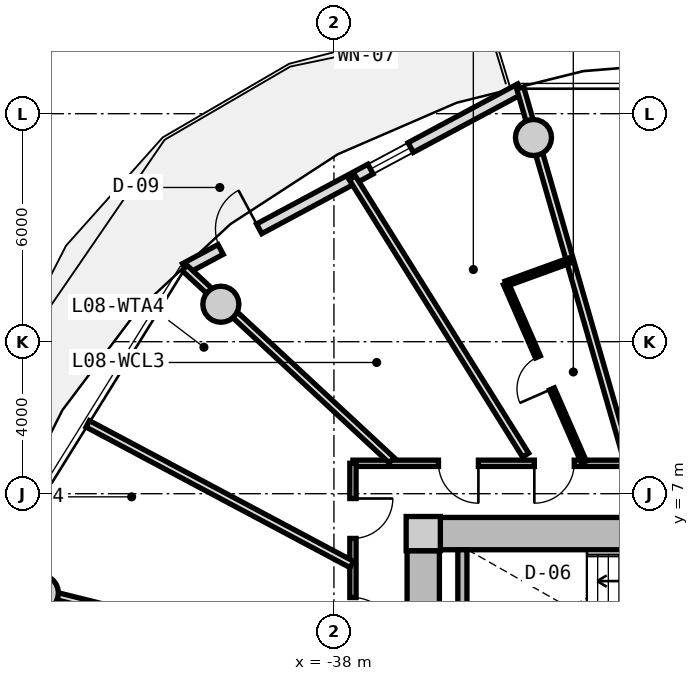
"""IFC4 building model, lengths in metres.
Left out: names, types, materials, properties, quantities, classifications, styles, units other than length and angle.
Written with IfcOpenShell. Run it as: python <this file> out.ifc"""

import sys

from ifc_helpers import new_model, si_unit, direction, frame, frame_2d, origin, origin_2d, place, context, subcontext, project, spatial, rectangle, circle, extrude, source, transform, mapped, element, fill, save


model = new_model("IFC4")
c1 = context("Model", 3, precision=1e-05, world=origin(), true_north=direction((0.0, 1.0)))
c2 = subcontext(c1, "Body", "Model", "MODEL_VIEW")
j1 = project(units=[si_unit("LENGTHUNIT", "METRE"), si_unit("PLANEANGLEUNIT", "RADIAN")], contexts=[c1])
p1 = place(None, origin())
s1 = spatial("IfcSite", under=j1, at=p1, CompositionType="ELEMENT")
p2 = place(p1, origin())
s2 = spatial("IfcBuilding", under=s1, at=p2, CompositionType="ELEMENT")
p3 = place(p2, frame((0.0, 0.0, 30.75)))
s3 = spatial("IfcBuildingStorey", under=s2, at=p3, CompositionType="ELEMENT", Elevation=30.75)
m1 = source(origin(), c2, "Body", "SweptSolid", [
    extrude(rectangle(XDim=0.9, YDim=0.9, at=origin_2d()), origin(), (0.0, 0.0, 1.0), 3.05),
])
p4 = place(p3, frame((-35.65, 5.95, 0.0), z_axis=(0.0, 0.0, 1.0), x_axis=(1.0, 0.0, 0.0)))
e1 = element("IfcColumn", 1, at=p4, inside=s3, PredefinedType="COLUMN", context=c2, shape_type="MappedRepresentation", body=[
    mapped(m1, transform((0.0, 0.0, 0.0), x_axis=(1.0, 0.0, 0.0), y_axis=(0.0, 1.0, 0.0), z_axis=(0.0, 0.0, 1.0), scale=1.0)),
])
m2 = source(origin(), c2, "Body", "SweptSolid", [
    extrude(rectangle(XDim=14.4, YDim=0.85, at=frame_2d((7.2, 0.0))), origin(), (0.0, 0.0, 1.0), 2.79),
])
p5 = place(p3, frame((-35.2, 5.95, 0.0), z_axis=(0.0, 0.0, 1.0), x_axis=(1.0, 0.0, 0.0)))
e2 = element("IfcWall", 2, at=p5, inside=s3, PredefinedType="SHEAR", context=c2, shape_type="MappedRepresentation", body=[
    mapped(m2, transform((0.0, 0.0, 0.0), x_axis=(1.0, 0.0, 0.0), y_axis=(0.0, 1.0, 0.0), z_axis=(0.0, 0.0, 1.0), scale=1.0)),
])
m3 = source(origin(), c2, "Body", "SweptSolid", [
    extrude(rectangle(XDim=11.0, YDim=0.85, at=frame_2d((5.5, 0.0))), origin(), (0.0, 0.0, 1.0), 2.79),
])
p6 = place(p3, frame((-35.65, -5.5, 0.0), z_axis=(0.0, 0.0, 1.0), x_axis=(0.0, 1.0, 0.0)))
e3 = element("IfcWall", 3, at=p6, inside=s3, PredefinedType="SHEAR", context=c2, shape_type="MappedRepresentation", body=[
    mapped(m3, transform((0.0, 0.0, 0.0), x_axis=(1.0, 0.0, 0.0), y_axis=(0.0, 1.0, 0.0), z_axis=(0.0, 0.0, 1.0), scale=1.0)),
])
p7 = place(p6, frame((3.8, 0.0, 0.0)))
e4 = element("IfcOpeningElement", 4, at=p7, cuts=e3, PredefinedType="OPENING", context=c2, shape_type="SweptSolid", body=[
    extrude(rectangle(XDim=1.2, YDim=2.15, at=frame_2d((0.6, 1.075))), frame((0.0, 0.435, 0.0), z_axis=(0.0, -1.0, 0.0), x_axis=(1.0, 0.0, 0.0)), (0.0, 0.0, 1.0), 0.87),
])
m4 = source(origin(), c2, "Body", "SweptSolid", [
    extrude(circle(Radius=0.475, at=origin_2d()), origin(), (0.0, 0.0, 1.0), 3.05),
])
for number, where, z_axis, x_axis in (
    (5, (-32.749, 16.373, 0.0), (0.0, 0.0, 1.0), (1.0, 0.0, 0.0)),
    (6, (-40.975, 11.985, 0.0), (0.0, 0.0, 1.0), (1.0, 0.0, 0.0)),
    (7, (-45.725, 4.387, 0.0), (0.0, 0.0, 1.0), (1.0, 0.0, 0.0)),
):
    element("IfcColumn", number, at=place(p3, frame(where, z_axis=z_axis, x_axis=x_axis)), inside=s3, PredefinedType="COLUMN", context=c2, shape_type="MappedRepresentation", body=[
        mapped(m4, transform((0.0, 0.0, 0.0), x_axis=(1.0, 0.0, 0.0), y_axis=(0.0, 1.0, 0.0), z_axis=(0.0, 0.0, 1.0), scale=1.0)),
    ])
m5 = source(origin(), c2, "Body", "SweptSolid", [
    extrude(rectangle(XDim=10.011, YDim=0.29, at=frame_2d((5.005, 0.0))), origin(), (0.0, 0.0, 1.0), 2.79),
])
p8 = place(p3, frame((-41.916, 12.926, 0.0), z_axis=(0.0, 0.0, 1.0), x_axis=(0.881272505317, 0.472608475773, 0.0)))
e8 = element("IfcWall", 8, at=p8, inside=s3, PredefinedType="SOLIDWALL", context=c2, shape_type="MappedRepresentation", body=[
    mapped(m5, transform((0.0, 0.0, 0.0), x_axis=(1.0, 0.0, 0.0), y_axis=(0.0, 1.0, 0.0), z_axis=(0.0, 0.0, 1.0), scale=1.0)),
])
p9 = place(p8, frame((1.06, 0.0, 0.0)))
e9 = element("IfcOpeningElement", 9, at=p9, cuts=e8, PredefinedType="OPENING", context=c2, shape_type="SweptSolid", body=[
    extrude(rectangle(XDim=1.15, YDim=2.25, at=frame_2d((0.575, 1.125))), frame((0.0, 0.155, 0.0), z_axis=(0.0, -1.0, 0.0), x_axis=(1.0, 0.0, 0.0)), (0.0, 0.0, 1.0), 0.31),
])
p10 = place(p8, frame((5.535, 0.0, 0.85)))
e10 = element("IfcOpeningElement", 10, at=p10, cuts=e8, PredefinedType="OPENING", context=c2, shape_type="SweptSolid", body=[
    extrude(rectangle(XDim=1.2, YDim=1.5, at=frame_2d((0.6, 0.75))), frame((0.0, 0.155, 0.0), z_axis=(0.0, -1.0, 0.0), x_axis=(1.0, 0.0, 0.0)), (0.0, 0.0, 1.0), 0.31),
])
m6 = source(origin(), c2, "Body", "SweptSolid", [
    extrude(rectangle(XDim=3.075, YDim=0.24, at=frame_2d((1.538, 0.0))), origin(), (0.0, 0.0, 1.0), 2.79),
])
p11 = place(p3, frame((-34.62, 2.45, 0.0), z_axis=(0.0, 0.0, 1.0), x_axis=(0.0, 1.0, 0.0)))
e11 = element("IfcWall", 11, at=p11, inside=s3, PredefinedType="PARTITIONING", context=c2, shape_type="MappedRepresentation", body=[
    mapped(m6, transform((0.0, 0.0, 0.0), x_axis=(1.0, 0.0, 0.0), y_axis=(0.0, 1.0, 0.0), z_axis=(0.0, 0.0, 1.0), scale=1.0)),
])
m7 = source(origin(), c2, "Body", "SweptSolid", [
    extrude(rectangle(XDim=19.0, YDim=0.165, at=frame_2d((9.5, 0.0))), origin(), (0.0, 0.0, 1.0), 2.775),
])
p12 = place(p3, frame((-37.5, 7.8, 0.0), z_axis=(0.0, 0.0, 1.0), x_axis=(1.0, 0.0, 0.0)))
e12 = element("IfcWall", 12, at=p12, inside=s3, PredefinedType="PARTITIONING", context=c2, shape_type="MappedRepresentation", body=[
    mapped(m7, transform((0.0, 0.0, 0.0), x_axis=(1.0, 0.0, 0.0), y_axis=(0.0, 1.0, 0.0), z_axis=(0.0, 0.0, 1.0), scale=1.0)),
])
p13 = place(p12, frame((9.352, 0.0, 0.0)))
e13 = element("IfcOpeningElement", 13, at=p13, cuts=e12, PredefinedType="OPENING", context=c2, shape_type="SweptSolid", body=[
    extrude(rectangle(XDim=1.05, YDim=2.15, at=frame_2d((0.525, 1.075))), frame((0.0, 0.093, 0.0), z_axis=(0.0, -1.0, 0.0), x_axis=(1.0, 0.0, 0.0)), (0.0, 0.0, 1.0), 0.185),
])
p14 = place(p12, frame((7.806, 0.0, 0.0)))
e14 = element("IfcOpeningElement", 14, at=p14, cuts=e12, PredefinedType="OPENING", context=c2, shape_type="SweptSolid", body=[
    extrude(rectangle(XDim=1.05, YDim=2.15, at=frame_2d((0.525, 1.075))), frame((0.0, 0.093, 0.0), z_axis=(0.0, -1.0, 0.0), x_axis=(1.0, 0.0, 0.0)), (0.0, 0.0, 1.0), 0.185),
])
p15 = place(p12, frame((4.773, 0.0, 0.0)))
e15 = element("IfcOpeningElement", 15, at=p15, cuts=e12, PredefinedType="OPENING", context=c2, shape_type="SweptSolid", body=[
    extrude(rectangle(XDim=1.05, YDim=2.15, at=frame_2d((0.525, 1.075))), frame((0.0, 0.093, 0.0), z_axis=(0.0, -1.0, 0.0), x_axis=(1.0, 0.0, 0.0)), (0.0, 0.0, 1.0), 0.185),
])
p16 = place(p12, frame((2.251, 0.0, 0.0)))
e16 = element("IfcOpeningElement", 16, at=p16, cuts=e12, PredefinedType="OPENING", context=c2, shape_type="SweptSolid", body=[
    extrude(rectangle(XDim=1.05, YDim=2.15, at=frame_2d((0.525, 1.075))), frame((0.0, 0.093, 0.0), z_axis=(0.0, -1.0, 0.0), x_axis=(1.0, 0.0, 0.0)), (0.0, 0.0, 1.0), 0.185),
])
p17 = place(p12, frame((14.653, 0.0, 0.0)))
e17 = element("IfcOpeningElement", 17, at=p17, cuts=e12, PredefinedType="OPENING", context=c2, shape_type="SweptSolid", body=[
    extrude(rectangle(XDim=1.05, YDim=2.15, at=frame_2d((0.525, 1.075))), frame((0.0, 0.093, 0.0), z_axis=(0.0, -1.0, 0.0), x_axis=(1.0, 0.0, 0.0)), (0.0, 0.0, 1.0), 0.185),
])
p18 = place(p12, frame((12.5, 0.0, 0.0)))
e18 = element("IfcOpeningElement", 18, at=p18, cuts=e12, PredefinedType="OPENING", context=c2, shape_type="SweptSolid", body=[
    extrude(rectangle(XDim=1.05, YDim=2.15, at=frame_2d((0.525, 1.075))), frame((0.0, 0.093, 0.0), z_axis=(0.0, -1.0, 0.0), x_axis=(1.0, 0.0, 0.0)), (0.0, 0.0, 1.0), 0.185),
])
m8 = source(origin(), c2, "Body", "SweptSolid", [
    extrude(rectangle(XDim=15.6, YDim=0.165, at=frame_2d((7.8, 0.0))), origin(), (0.0, 0.0, 1.0), 2.775),
])
p19 = place(p3, frame((-37.5, -7.8, 0.0), z_axis=(0.0, 0.0, 1.0), x_axis=(0.0, 1.0, 0.0)))
e19 = element("IfcWall", 19, at=p19, inside=s3, PredefinedType="PARTITIONING", context=c2, shape_type="MappedRepresentation", body=[
    mapped(m8, transform((0.0, 0.0, 0.0), x_axis=(1.0, 0.0, 0.0), y_axis=(0.0, 1.0, 0.0), z_axis=(0.0, 0.0, 1.0), scale=1.0)),
])
p20 = place(p19, frame((13.623, 0.0, 0.0)))
e20 = element("IfcOpeningElement", 20, at=p20, cuts=e19, PredefinedType="OPENING", context=c2, shape_type="SweptSolid", body=[
    extrude(rectangle(XDim=1.05, YDim=2.15, at=frame_2d((0.525, 1.075))), frame((0.0, 0.093, 0.0), z_axis=(0.0, -1.0, 0.0), x_axis=(1.0, 0.0, 0.0)), (0.0, 0.0, 1.0), 0.185),
])
p21 = place(p19, frame((11.018, 0.0, 0.0)))
e21 = element("IfcOpeningElement", 21, at=p21, cuts=e19, PredefinedType="OPENING", context=c2, shape_type="SweptSolid", body=[
    extrude(rectangle(XDim=1.05, YDim=2.15, at=frame_2d((0.525, 1.075))), frame((0.0, 0.093, 0.0), z_axis=(0.0, -1.0, 0.0), x_axis=(1.0, 0.0, 0.0)), (0.0, 0.0, 1.0), 0.185),
])
p22 = place(p19, frame((8.467, 0.0, 0.0)))
e22 = element("IfcOpeningElement", 22, at=p22, cuts=e19, PredefinedType="OPENING", context=c2, shape_type="SweptSolid", body=[
    extrude(rectangle(XDim=1.05, YDim=2.15, at=frame_2d((0.525, 1.075))), frame((0.0, 0.093, 0.0), z_axis=(0.0, -1.0, 0.0), x_axis=(1.0, 0.0, 0.0)), (0.0, 0.0, 1.0), 0.185),
])
p23 = place(p19, frame((6.035, 0.0, 0.0)))
e23 = element("IfcOpeningElement", 23, at=p23, cuts=e19, PredefinedType="OPENING", context=c2, shape_type="SweptSolid", body=[
    extrude(rectangle(XDim=1.05, YDim=2.15, at=frame_2d((0.525, 1.075))), frame((0.0, 0.093, 0.0), z_axis=(0.0, -1.0, 0.0), x_axis=(1.0, 0.0, 0.0)), (0.0, 0.0, 1.0), 0.185),
])
p24 = place(p19, frame((4.034, 0.0, 0.0)))
e24 = element("IfcOpeningElement", 24, at=p24, cuts=e19, PredefinedType="OPENING", context=c2, shape_type="SweptSolid", body=[
    extrude(rectangle(XDim=0.92, YDim=2.1, at=frame_2d((0.46, 1.05))), frame((0.0, 0.093, 0.0), z_axis=(0.0, -1.0, 0.0), x_axis=(1.0, 0.0, 0.0)), (0.0, 0.0, 1.0), 0.185),
])
p25 = place(p19, frame((1.426, 0.0, 0.0)))
e25 = element("IfcOpeningElement", 25, at=p25, cuts=e19, PredefinedType="OPENING", context=c2, shape_type="SweptSolid", body=[
    extrude(rectangle(XDim=0.92, YDim=2.1, at=frame_2d((0.46, 1.05))), frame((0.0, 0.093, 0.0), z_axis=(0.0, -1.0, 0.0), x_axis=(1.0, 0.0, 0.0)), (0.0, 0.0, 1.0), 0.185),
])
m9 = source(origin(), c2, "Body", "SweptSolid", [
    extrude(rectangle(XDim=10.196, YDim=0.19, at=frame_2d((5.098, 0.0))), origin(), (0.0, 0.0, 1.0), 2.225),
])
p26 = place(p3, frame((-30.273, 7.88, 0.0), z_axis=(0.0, 0.0, 1.0), x_axis=(-0.277136420347, 0.960830580549, 0.0)))
e26 = element("IfcWall", 26, at=p26, inside=s3, PredefinedType="PARTITIONING", context=c2, shape_type="MappedRepresentation", body=[
    mapped(m9, transform((0.0, 0.0, 0.0), x_axis=(1.0, 0.0, 0.0), y_axis=(0.0, 1.0, 0.0), z_axis=(0.0, 0.0, 1.0), scale=1.0)),
])
m10 = source(origin(), c2, "Body", "SweptSolid", [
    extrude(rectangle(XDim=7.435, YDim=0.19, at=frame_2d((3.717, 0.0))), origin(), (0.0, 0.0, 1.0), 2.225),
])
p27 = place(p3, frame((-36.483, 7.88, 0.0), z_axis=(0.0, 0.0, 1.0), x_axis=(-0.732651956848, 0.680603489652, 0.0)))
e27 = element("IfcWall", 27, at=p27, inside=s3, PredefinedType="PARTITIONING", context=c2, shape_type="MappedRepresentation", body=[
    mapped(m10, transform((0.0, 0.0, 0.0), x_axis=(1.0, 0.0, 0.0), y_axis=(0.0, 1.0, 0.0), z_axis=(0.0, 0.0, 1.0), scale=1.0)),
])
m11 = source(origin(), c2, "Body", "SweptSolid", [
    extrude(rectangle(XDim=8.598, YDim=0.19, at=frame_2d((4.299, 0.0))), origin(), (0.0, 0.0, 1.0), 2.775),
])
p28 = place(p3, frame((-32.957, 8.017, 0.0), z_axis=(0.0, 0.0, 1.0), x_axis=(-0.530039776395, 0.847972779893, 0.0)))
e28 = element("IfcWall", 28, at=p28, inside=s3, PredefinedType="PARTITIONING", context=c2, shape_type="MappedRepresentation", body=[
    mapped(m11, transform((0.0, 0.0, 0.0), x_axis=(1.0, 0.0, 0.0), y_axis=(0.0, 1.0, 0.0), z_axis=(0.0, 0.0, 1.0), scale=1.0)),
])
m12 = source(origin(), c2, "Body", "SweptSolid", [
    extrude(rectangle(XDim=5.126, YDim=0.14, at=frame_2d((2.563, 0.0))), origin(), (0.0, 0.0, 1.0), 2.775),
])
p29 = place(p3, frame((-31.422, 7.83, 0.0), z_axis=(0.0, 0.0, 1.0), x_axis=(-0.400473994842, 0.916308124735, 0.0)))
e29 = element("IfcWall", 29, at=p29, inside=s3, PredefinedType="PARTITIONING", context=c2, shape_type="MappedRepresentation", body=[
    mapped(m12, transform((0.0, 0.0, 0.0), x_axis=(1.0, 0.0, 0.0), y_axis=(0.0, 1.0, 0.0), z_axis=(0.0, 0.0, 1.0), scale=1.0)),
])
p30 = place(p29, frame((2.103, 0.0, 0.0)))
e30 = element("IfcOpeningElement", 30, at=p30, cuts=e29, PredefinedType="OPENING", context=c2, shape_type="SweptSolid", body=[
    extrude(rectangle(XDim=0.92, YDim=2.1, at=frame_2d((0.46, 1.05))), frame((0.0, 0.08, 0.0), z_axis=(0.0, -1.0, 0.0), x_axis=(1.0, 0.0, 0.0)), (0.0, 0.0, 1.0), 0.16),
])
m13 = source(origin(), c2, "Body", "SweptSolid", [
    extrude(rectangle(XDim=1.811, YDim=0.14, at=frame_2d((0.906, 0.0))), origin(), (0.0, 0.0, 1.0), 2.775),
])
p31 = place(p3, frame((-33.475, 12.527, 0.0), z_axis=(0.0, 0.0, 1.0), x_axis=(0.940009682452, 0.341147764021, 0.0)))
e31 = element("IfcWall", 31, at=p31, inside=s3, PredefinedType="PARTITIONING", context=c2, shape_type="MappedRepresentation", body=[
    mapped(m13, transform((0.0, 0.0, 0.0), x_axis=(1.0, 0.0, 0.0), y_axis=(0.0, 1.0, 0.0), z_axis=(0.0, 0.0, 1.0), scale=1.0)),
])
m14 = source(origin(), c2, "Body", "SweptSolid", [
    extrude(rectangle(XDim=9.737, YDim=0.19, at=frame_2d((4.869, 0.0))), origin(), (0.0, 0.0, 1.0), 2.415),
])
p32 = place(p3, frame((-37.58, 2.385, 0.0), z_axis=(0.0, 0.0, 1.0), x_axis=(-0.970392716238, 0.241532557375, 0.0)))
e32 = element("IfcWall", 32, at=p32, inside=s3, PredefinedType="PARTITIONING", context=c2, shape_type="MappedRepresentation", body=[
    mapped(m14, transform((0.0, 0.0, 0.0), x_axis=(1.0, 0.0, 0.0), y_axis=(0.0, 1.0, 0.0), z_axis=(0.0, 0.0, 1.0), scale=1.0)),
])
m15 = source(origin(), c2, "Body", "SweptSolid", [
    extrude(rectangle(XDim=7.873, YDim=0.19, at=frame_2d((3.937, 0.0))), origin(), (0.0, 0.0, 1.0), 2.775),
])
p33 = place(p3, frame((-37.53, 5.138, 0.0), z_axis=(0.0, 0.0, 1.0), x_axis=(-0.882666052726, 0.470000680175, 0.0)))
e33 = element("IfcWall", 33, at=p33, inside=s3, PredefinedType="PARTITIONING", context=c2, shape_type="MappedRepresentation", body=[
    mapped(m15, transform((0.0, 0.0, 0.0), x_axis=(1.0, 0.0, 0.0), y_axis=(0.0, 1.0, 0.0), z_axis=(0.0, 0.0, 1.0), scale=1.0)),
])
m16 = source(origin(), c2, "Body", "SweptSolid", [
    extrude(rectangle(XDim=1.15, YDim=2.25, at=frame_2d((0.575, 1.125))), frame((0.0, 0.025, 0.0), z_axis=(0.0, -1.0, 0.0), x_axis=(1.0, 0.0, 0.0)), (0.0, 0.0, 1.0), 0.05),
])
p34 = place(p9, origin())
e34 = element("IfcDoor", 34, at=p34, inside=s3, OperationType="SINGLE_SWING_RIGHT", PredefinedType="DOOR", context=c2, shape_type="MappedRepresentation", body=[
    mapped(m16, transform((0.0, 0.0, 0.0), x_axis=(1.0, 0.0, 0.0), y_axis=(0.0, 1.0, 0.0), z_axis=(0.0, 0.0, 1.0), scale=1.0)),
])
fill(e9, e34)
m17 = source(origin(), c2, "Body", "SweptSolid", [
    extrude(rectangle(XDim=1.2, YDim=1.5, at=frame_2d((0.6, 0.75))), frame((0.0, 0.03, 0.0), z_axis=(0.0, -1.0, 0.0), x_axis=(1.0, 0.0, 0.0)), (0.0, 0.0, 1.0), 0.06),
])
p35 = place(p10, origin())
e35 = element("IfcWindow", 35, at=p35, inside=s3, PartitioningType="SINGLE_PANEL", PredefinedType="WINDOW", context=c2, shape_type="MappedRepresentation", body=[
    mapped(m17, transform((0.0, 0.0, 0.0), x_axis=(1.0, 0.0, 0.0), y_axis=(0.0, 1.0, 0.0), z_axis=(0.0, 0.0, 1.0), scale=1.0)),
])
fill(e10, e35)
m18 = source(origin(), c2, "Body", "SweptSolid", [
    extrude(rectangle(XDim=1.05, YDim=2.15, at=frame_2d((0.525, 1.075))), frame((0.0, 0.025, 0.0), z_axis=(0.0, -1.0, 0.0), x_axis=(1.0, 0.0, 0.0)), (0.0, 0.0, 1.0), 0.05),
])
p36 = place(p15, frame((1.05, 0.0, 0.0), z_axis=(0.0, 0.0, 1.0), x_axis=(-1.0, 0.0, 0.0)))
e36 = element("IfcDoor", 36, at=p36, inside=s3, OperationType="SINGLE_SWING_RIGHT", PredefinedType="DOOR", context=c2, shape_type="MappedRepresentation", body=[
    mapped(m18, transform((0.0, 0.0, 0.0), x_axis=(1.0, 0.0, 0.0), y_axis=(0.0, 1.0, 0.0), z_axis=(0.0, 0.0, 1.0), scale=1.0)),
])
fill(e15, e36)
m19 = source(origin(), c2, "Body", "SweptSolid", [
    extrude(rectangle(XDim=0.92, YDim=2.1, at=frame_2d((0.46, 1.05))), frame((0.0, 0.025, 0.0), z_axis=(0.0, -1.0, 0.0), x_axis=(1.0, 0.0, 0.0)), (0.0, 0.0, 1.0), 0.05),
])
p37 = place(p30, origin())
e37 = element("IfcDoor", 37, at=p37, inside=s3, OperationType="SINGLE_SWING_LEFT", PredefinedType="DOOR", context=c2, shape_type="MappedRepresentation", body=[
    mapped(m19, transform((0.0, 0.0, 0.0), x_axis=(1.0, 0.0, 0.0), y_axis=(0.0, 1.0, 0.0), z_axis=(0.0, 0.0, 1.0), scale=1.0)),
])
fill(e30, e37)
p38 = place(p16, frame((1.05, 0.0, 0.0), z_axis=(0.0, 0.0, 1.0), x_axis=(-1.0, 0.0, 0.0)))
e38 = element("IfcDoor", 38, at=p38, inside=s3, OperationType="SINGLE_SWING_LEFT", PredefinedType="DOOR", context=c2, shape_type="MappedRepresentation", body=[
    mapped(m18, transform((0.0, 0.0, 0.0), x_axis=(1.0, 0.0, 0.0), y_axis=(0.0, 1.0, 0.0), z_axis=(0.0, 0.0, 1.0), scale=1.0)),
])
fill(e16, e38)
p39 = place(p20, frame((1.05, 0.0, 0.0), z_axis=(0.0, 0.0, 1.0), x_axis=(-1.0, 0.0, 0.0)))
e39 = element("IfcDoor", 39, at=p39, inside=s3, OperationType="SINGLE_SWING_LEFT", PredefinedType="DOOR", context=c2, shape_type="MappedRepresentation", body=[
    mapped(m18, transform((0.0, 0.0, 0.0), x_axis=(1.0, 0.0, 0.0), y_axis=(0.0, 1.0, 0.0), z_axis=(0.0, 0.0, 1.0), scale=1.0)),
])
fill(e20, e39)
p40 = place(p21, frame((1.05, 0.0, 0.0), z_axis=(0.0, 0.0, 1.0), x_axis=(-1.0, 0.0, 0.0)))
e40 = element("IfcDoor", 40, at=p40, inside=s3, OperationType="SINGLE_SWING_RIGHT", PredefinedType="DOOR", context=c2, shape_type="MappedRepresentation", body=[
    mapped(m18, transform((0.0, 0.0, 0.0), x_axis=(1.0, 0.0, 0.0), y_axis=(0.0, 1.0, 0.0), z_axis=(0.0, 0.0, 1.0), scale=1.0)),
])
fill(e21, e40)
save(model, sys.argv[1])
